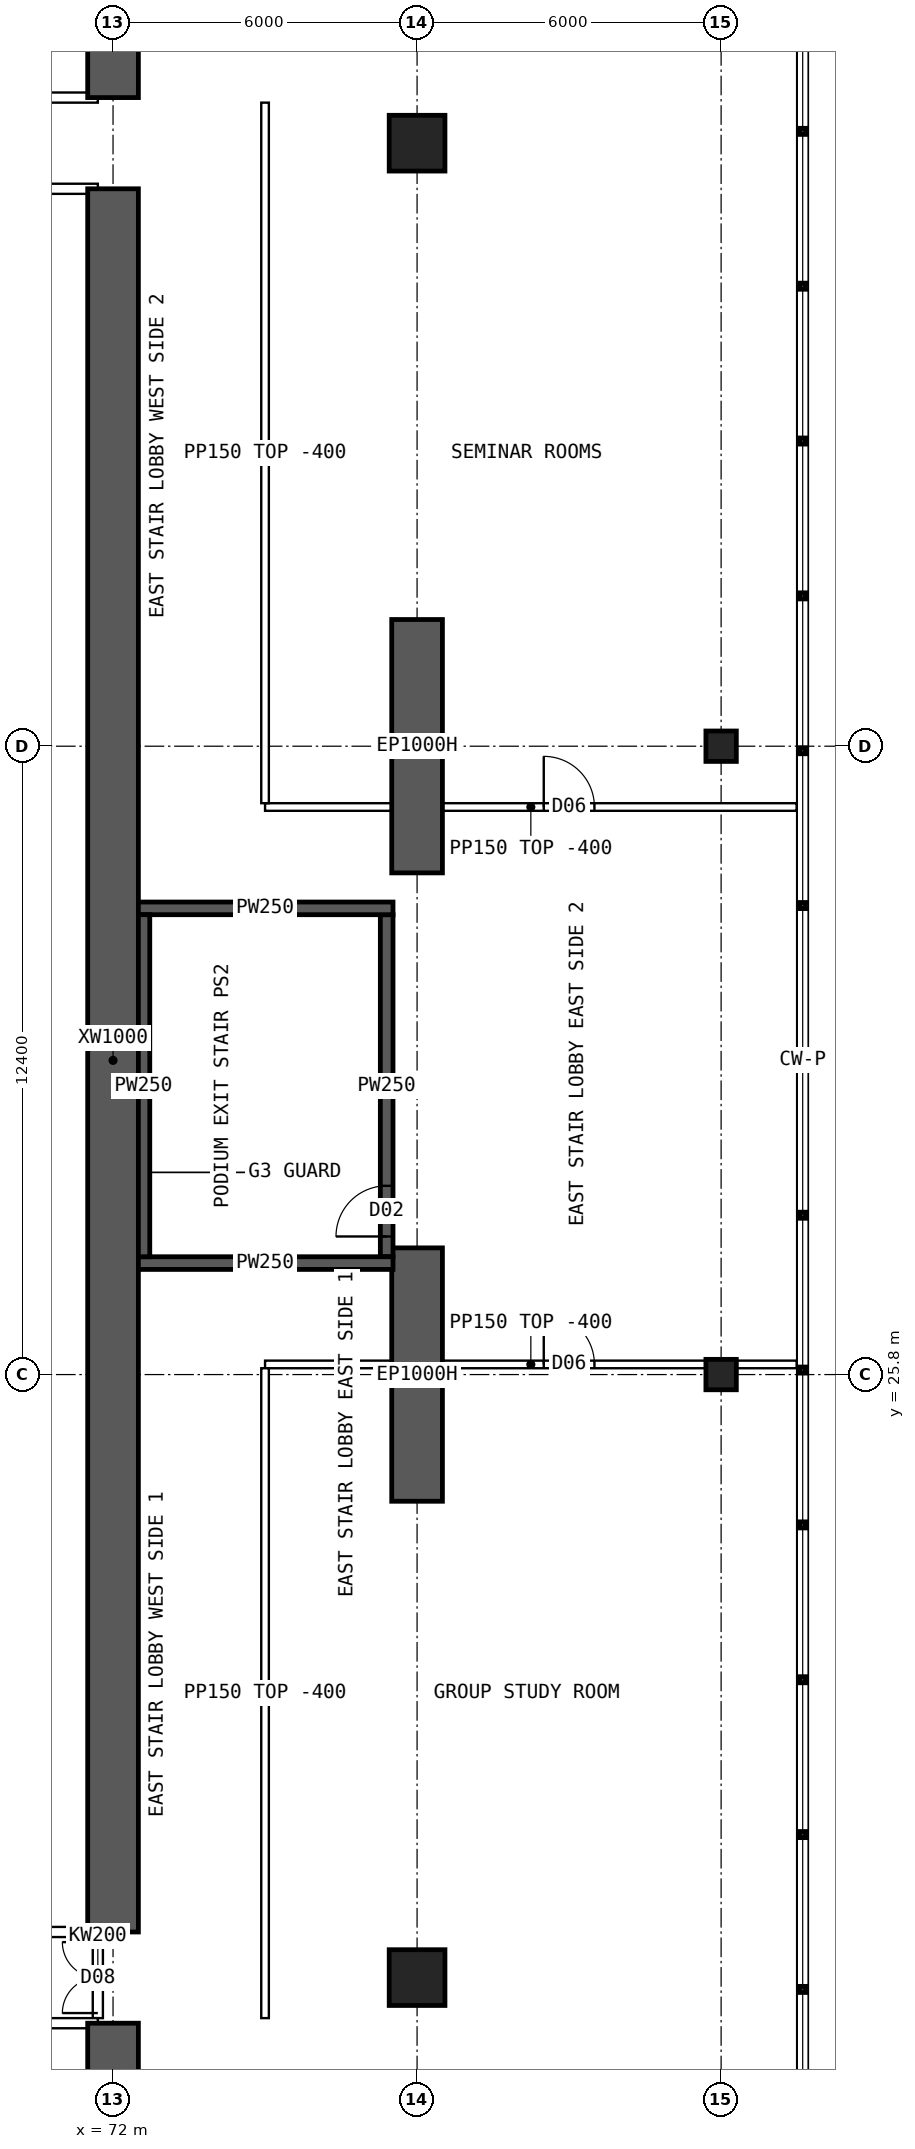
"""IFC4 building model, lengths in metres.
Left out: names, types, materials, properties, quantities, classifications, styles, units other than length and angle.
Written with IfcOpenShell. Run it as: python <this file> out.ifc"""

import sys

from ifc_helpers import new_model, si_unit, direction, frame, frame_2d, origin, origin_2d, place, context, subcontext, project, spatial, polyline, rectangle, hollow_rectangle, outline, extrude, element, fill, save


model = new_model("IFC4")
c1 = context("Model", 3, precision=1e-05, world=origin(), true_north=direction((0.0, 1.0)))
c2 = subcontext(c1, "Body", "Model", "MODEL_VIEW")
j1 = project(units=[si_unit("LENGTHUNIT", "METRE"), si_unit("PLANEANGLEUNIT", "RADIAN")], contexts=[c1])
p1 = place(None, origin())
s1 = spatial("IfcSite", under=j1, at=p1, CompositionType="ELEMENT")
p2 = place(p1, origin())
s2 = spatial("IfcBuilding", under=s1, at=p2, CompositionType="ELEMENT")
p3 = place(p2, frame((0.0, 0.0, 11.0)))
s3 = spatial("IfcBuildingStorey", under=s2, at=p3, CompositionType="ELEMENT", Elevation=11.0)
for number, where, z_axis, x_axis in (
    (1, (78.0, 23.3, 0.0), (0.0, 0.0, 1.0), (0.0, 1.0, 0.0)),
    (2, (78.0, 35.7, 0.0), (0.0, 0.0, 1.0), (0.0, 1.0, 0.0)),
):
    element("IfcWall", number, at=place(p3, frame(where, z_axis=z_axis, x_axis=x_axis)), inside=s3, PredefinedType="SHEAR", context=c2, shape_type="SweptSolid", body=[
        extrude(rectangle(XDim=5.0, YDim=1.0, at=frame_2d((2.5, 0.0))), origin(), (0.0, 0.0, 1.0), 5.0),
    ])
for number, where, z_axis, x_axis in (
    (3, (78.0, 13.9, 0.0), (0.0, 0.0, 1.0), (1.0, 0.0, 0.0)),
    (4, (78.0, 50.1, 0.0), (0.0, 0.0, 1.0), (1.0, 0.0, 0.0)),
):
    element("IfcColumn", number, at=place(p3, frame(where, z_axis=z_axis, x_axis=x_axis)), inside=s3, PredefinedType="COLUMN", context=c2, shape_type="SweptSolid", body=[
        extrude(hollow_rectangle(XDim=1.1, YDim=1.1, WallThickness=0.11, at=origin_2d()), origin(), (0.0, 0.0, 1.0), 5.0),
    ])
for number, where, z_axis, x_axis in (
    (5, (84.0, 25.8, 0.0), (0.0, 0.0, 1.0), (1.0, 0.0, 0.0)),
    (6, (84.0, 38.2, 0.0), (0.0, 0.0, 1.0), (1.0, 0.0, 0.0)),
):
    element("IfcColumn", number, at=place(p3, frame(where, z_axis=z_axis, x_axis=x_axis)), inside=s3, PredefinedType="COLUMN", context=c2, shape_type="SweptSolid", body=[
        extrude(hollow_rectangle(XDim=0.6, YDim=0.6, WallThickness=0.06, at=origin_2d()), origin(), (0.0, 0.0, 1.0), 5.0),
    ])
p4 = place(p3, frame((72.475, 28.0, 0.0), z_axis=(0.0, 0.0, 1.0), x_axis=(1.0, 0.0, 0.0)))
e7 = element("IfcWall", 7, at=p4, inside=s3, PredefinedType="SHEAR", context=c2, shape_type="SweptSolid", body=[
    extrude(rectangle(XDim=5.05, YDim=0.25, at=frame_2d((2.525, 0.0))), origin(), (0.0, 0.0, 1.0), 5.0),
])
p5 = place(p3, frame((77.4, 28.125, 0.0), z_axis=(0.0, 0.0, 1.0), x_axis=(0.0, 1.0, 0.0)))
e8 = element("IfcWall", 8, at=p5, inside=s3, PredefinedType="SHEAR", context=c2, shape_type="SweptSolid", body=[
    extrude(rectangle(XDim=6.75, YDim=0.25, at=frame_2d((3.375, 0.0))), origin(), (0.0, 0.0, 1.0), 5.0),
])
p6 = place(p5, frame((0.4, 0.0, 0.0)))
e9 = element("IfcOpeningElement", 9, at=p6, cuts=e8, PredefinedType="OPENING", context=c2, shape_type="SweptSolid", body=[
    extrude(rectangle(XDim=1.0, YDim=2.1, at=frame_2d((0.5, 1.05))), frame((0.0, 0.135, 0.0), z_axis=(0.0, -1.0, 0.0), x_axis=(1.0, 0.0, 0.0)), (0.0, 0.0, 1.0), 0.27),
])
p7 = place(p3, frame((77.525, 35.0, 0.0), z_axis=(0.0, 0.0, 1.0), x_axis=(-1.0, 0.0, 0.0)))
e10 = element("IfcWall", 10, at=p7, inside=s3, PredefinedType="SHEAR", context=c2, shape_type="SweptSolid", body=[
    extrude(rectangle(XDim=5.05, YDim=0.25, at=frame_2d((2.525, 0.0))), origin(), (0.0, 0.0, 1.0), 5.0),
])
p8 = place(p3, frame((72.6, 34.875, 0.0), z_axis=(0.0, 0.0, 1.0), x_axis=(0.0, -1.0, 0.0)))
e11 = element("IfcWall", 11, at=p8, inside=s3, PredefinedType="SHEAR", context=c2, shape_type="SweptSolid", body=[
    extrude(rectangle(XDim=6.75, YDim=0.25, at=frame_2d((3.375, 0.0))), origin(), (0.0, 0.0, 1.0), 5.0),
])
for number, where, z_axis, x_axis in (
    (12, (72.0, 7.7, 0.0), (0.0, 0.0, 1.0), (0.0, 1.0, 0.0)),
    (13, (72.0, 51.0, 0.0), (0.0, 0.0, 1.0), (0.0, 1.0, 0.0)),
):
    element("IfcWall", number, at=place(p3, frame(where, z_axis=z_axis, x_axis=x_axis)), inside=s3, PredefinedType="SHEAR", context=c2, shape_type="SweptSolid", body=[
        extrude(rectangle(XDim=5.3, YDim=1.0, at=frame_2d((2.65, 0.0))), origin(), (0.0, 0.0, 1.0), 5.0),
    ])
p9 = place(p3, frame((72.0, 14.8, 0.0), z_axis=(0.0, 0.0, 1.0), x_axis=(0.0, 1.0, 0.0)))
e14 = element("IfcWall", 14, at=p9, inside=s3, PredefinedType="SHEAR", context=c2, shape_type="SweptSolid", body=[
    extrude(rectangle(XDim=34.4, YDim=1.0, at=frame_2d((17.2, 0.0))), origin(), (0.0, 0.0, 1.0), 5.0),
])
for number, where, z_axis, x_axis in (
    (15, (66.5, 13.0, 0.0), (0.0, 0.0, 1.0), (1.0, 0.0, 0.0)),
    (16, (66.5, 51.0, 0.0), (0.0, 0.0, 1.0), (1.0, 0.0, 0.0)),
):
    element("IfcWall", number, at=place(p3, frame(where, z_axis=z_axis, x_axis=x_axis)), inside=s3, PredefinedType="SOLIDWALL", context=c2, shape_type="SweptSolid", body=[
        extrude(rectangle(XDim=5.2, YDim=0.2, at=frame_2d((2.6, 0.0))), origin(), (0.0, 0.0, 1.0), 4.6),
    ])
for number, where, z_axis, x_axis in (
    (17, (68.4, 14.8, 0.0), (0.0, 0.0, 1.0), (1.0, 0.0, 0.0)),
    (18, (68.4, 49.2, 0.0), (0.0, 0.0, 1.0), (1.0, 0.0, 0.0)),
):
    element("IfcWall", number, at=place(p3, frame(where, z_axis=z_axis, x_axis=x_axis)), inside=s3, PredefinedType="SOLIDWALL", context=c2, shape_type="SweptSolid", body=[
        extrude(rectangle(XDim=3.3, YDim=0.2, at=frame_2d((1.65, 0.0))), origin(), (0.0, 0.0, 1.0), 4.6),
    ])
p10 = place(p3, frame((75.0, 26.0, 0.0), z_axis=(0.0, 0.0, 1.0), x_axis=(1.0, 0.0, 0.0)))
e19 = element("IfcWall", 19, at=p10, inside=s3, PredefinedType="PARTITIONING", context=c2, shape_type="SweptSolid", body=[
    extrude(outline(polyline([(0.0, 0.0), (10.49, 0.0), (10.49, 4.6), (9.302, 4.6), (9.3, 4.0), (8.702, 4.0), (8.7, 4.6), (0.0, 4.6), (0.0, 0.0)])), frame((0.0, 0.075, 0.0), z_axis=(0.0, -1.0, 0.0), x_axis=(1.0, 0.0, 0.0)), (0.0, 0.0, 1.0), 0.15),
])
p11 = place(p10, frame((5.5, 0.0, 0.0)))
e20 = element("IfcOpeningElement", 20, at=p11, cuts=e19, PredefinedType="OPENING", context=c2, shape_type="SweptSolid", body=[
    extrude(rectangle(XDim=1.0, YDim=2.1, at=frame_2d((0.5, 1.05))), frame((0.0, 0.085, 0.0), z_axis=(0.0, -1.0, 0.0), x_axis=(1.0, 0.0, 0.0)), (0.0, 0.0, 1.0), 0.17),
])
p12 = place(p3, frame((75.0, 37.0, 0.0), z_axis=(0.0, 0.0, 1.0), x_axis=(1.0, 0.0, 0.0)))
e21 = element("IfcWall", 21, at=p12, inside=s3, PredefinedType="PARTITIONING", context=c2, shape_type="SweptSolid", body=[
    extrude(outline(polyline([(0.0, 0.0), (10.49, 0.0), (10.49, 4.6), (9.302, 4.6), (9.3, 4.0), (8.702, 4.0), (8.7, 4.6), (0.0, 4.6), (0.0, 0.0)])), frame((0.0, 0.075, 0.0), z_axis=(0.0, -1.0, 0.0), x_axis=(1.0, 0.0, 0.0)), (0.0, 0.0, 1.0), 0.15),
])
p13 = place(p12, frame((5.5, 0.0, 0.0)))
e22 = element("IfcOpeningElement", 22, at=p13, cuts=e21, PredefinedType="OPENING", context=c2, shape_type="SweptSolid", body=[
    extrude(rectangle(XDim=1.0, YDim=2.1, at=frame_2d((0.5, 1.05))), frame((0.0, 0.085, 0.0), z_axis=(0.0, -1.0, 0.0), x_axis=(1.0, 0.0, 0.0)), (0.0, 0.0, 1.0), 0.17),
])
p14 = place(p3, frame((75.0, 13.1, 0.0), z_axis=(0.0, 0.0, 1.0), x_axis=(0.0, 1.0, 0.0)))
e23 = element("IfcWall", 23, at=p14, inside=s3, PredefinedType="PARTITIONING", context=c2, shape_type="SweptSolid", body=[
    extrude(rectangle(XDim=12.825, YDim=0.15, at=frame_2d((6.413, 0.0))), origin(), (0.0, 0.0, 1.0), 4.6),
])
p15 = place(p3, frame((75.0, 37.075, 0.0), z_axis=(0.0, 0.0, 1.0), x_axis=(0.0, 1.0, 0.0)))
e24 = element("IfcWall", 24, at=p15, inside=s3, PredefinedType="PARTITIONING", context=c2, shape_type="SweptSolid", body=[
    extrude(rectangle(XDim=13.825, YDim=0.15, at=frame_2d((6.913, 0.0))), origin(), (0.0, 0.0, 1.0), 4.6),
])
p16 = place(p3, frame((71.7, 13.1, 0.0), z_axis=(0.0, 0.0, 1.0), x_axis=(0.0, 1.0, 0.0)))
e25 = element("IfcWall", 25, at=p16, inside=s3, PredefinedType="SOLIDWALL", context=c2, shape_type="SweptSolid", body=[
    extrude(rectangle(XDim=1.6, YDim=0.2, at=frame_2d((0.8, 0.0))), origin(), (0.0, 0.0, 1.0), 4.6),
])
p17 = place(p16, frame((0.1, 0.0, 0.0)))
e26 = element("IfcOpeningElement", 26, at=p17, cuts=e25, PredefinedType="OPENING", context=c2, shape_type="SweptSolid", body=[
    extrude(rectangle(XDim=1.4, YDim=2.1, at=frame_2d((0.7, 1.05))), frame((0.0, 0.11, 0.0), z_axis=(0.0, -1.0, 0.0), x_axis=(1.0, 0.0, 0.0)), (0.0, 0.0, 1.0), 0.22),
])
p18 = place(p6, origin())
e27 = element("IfcDoor", 27, at=p18, inside=s3, OperationType="SINGLE_SWING_LEFT", PredefinedType="DOOR", context=c2, shape_type="SweptSolid", body=[
    extrude(rectangle(XDim=1.0, YDim=2.1, at=frame_2d((0.5, 1.05))), frame((0.0, 0.025, 0.0), z_axis=(0.0, -1.0, 0.0), x_axis=(1.0, 0.0, 0.0)), (0.0, 0.0, 1.0), 0.05),
])
fill(e9, e27)
p19 = place(p11, origin())
e28 = element("IfcDoor", 28, at=p19, inside=s3, OperationType="SINGLE_SWING_LEFT", PredefinedType="DOOR", context=c2, shape_type="SweptSolid", body=[
    extrude(rectangle(XDim=1.0, YDim=2.1, at=frame_2d((0.5, 1.05))), frame((0.0, 0.025, 0.0), z_axis=(0.0, -1.0, 0.0), x_axis=(1.0, 0.0, 0.0)), (0.0, 0.0, 1.0), 0.05),
])
fill(e20, e28)
p20 = place(p13, origin())
e29 = element("IfcDoor", 29, at=p20, inside=s3, OperationType="SINGLE_SWING_LEFT", PredefinedType="DOOR", context=c2, shape_type="SweptSolid", body=[
    extrude(rectangle(XDim=1.0, YDim=2.1, at=frame_2d((0.5, 1.05))), frame((0.0, 0.025, 0.0), z_axis=(0.0, -1.0, 0.0), x_axis=(1.0, 0.0, 0.0)), (0.0, 0.0, 1.0), 0.05),
])
fill(e22, e29)
p21 = place(p17, origin())
e30 = element("IfcDoor", 30, at=p21, inside=s3, OperationType="DOUBLE_DOOR_SINGLE_SWING", PredefinedType="DOOR", context=c2, shape_type="SweptSolid", body=[
    extrude(rectangle(XDim=1.4, YDim=2.1, at=frame_2d((0.7, 1.05))), frame((0.0, 0.025, 0.0), z_axis=(0.0, -1.0, 0.0), x_axis=(1.0, 0.0, 0.0)), (0.0, 0.0, 1.0), 0.05),
])
fill(e26, e30)
save(model, sys.argv[1])
